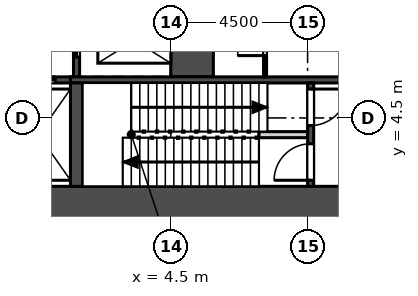
"""IFC4 building model, lengths in metres.
Left out: names, types, materials, properties, quantities, classifications, styles, units other than length and angle.
Written with IfcOpenShell. Run it as: python <this file> out.ifc"""

import sys

from ifc_helpers import new_model, si_unit, direction, frame, frame_2d, origin, place, context, subcontext, project, spatial, rectangle, extrude, element, fill, save


model = new_model("IFC4")
c1 = context("Model", 3, precision=1e-05, world=origin(), true_north=direction((0.0, 1.0)))
c2 = subcontext(c1, "Body", "Model", "MODEL_VIEW")
j1 = project(units=[si_unit("LENGTHUNIT", "METRE"), si_unit("PLANEANGLEUNIT", "RADIAN")], contexts=[c1])
p1 = place(None, origin())
s1 = spatial("IfcSite", under=j1, at=p1, CompositionType="ELEMENT")
p2 = place(p1, origin())
s2 = spatial("IfcBuilding", under=s1, at=p2, CompositionType="ELEMENT")
p3 = place(p2, frame((0.0, 0.0, 132.1)))
s3 = spatial("IfcBuildingStorey", under=s2, at=p3, CompositionType="ELEMENT", Elevation=132.1)
p4 = place(p3, frame((-13.8, 1.65, 0.0), z_axis=(0.0, 0.0, 1.0), x_axis=(1.0, 0.0, 0.0)))
e1 = element("IfcWall", 1, at=p4, inside=s3, PredefinedType="SHEAR", context=c2, shape_type="SweptSolid", body=[
    extrude(rectangle(XDim=27.6, YDim=1.2, at=frame_2d((13.8, 0.0))), origin(), (0.0, 0.0, 1.0), 5.4),
])
p5 = place(p3, frame((1.4, 5.85, -0.4), z_axis=(0.0, 0.0, 1.0), x_axis=(0.0, 1.0, 0.0)))
e2 = element("IfcWall", 2, at=p5, inside=s3, PredefinedType="SOLIDWALL", context=c2, shape_type="SweptSolid", body=[
    extrude(rectangle(XDim=11.75, YDim=0.2, at=frame_2d((5.875, 0.0))), origin(), (0.0, 0.0, 1.0), 5.4),
])
p6 = place(p5, frame((0.65, 0.0, 0.4)))
e3 = element("IfcOpeningElement", 3, at=p6, cuts=e2, PredefinedType="OPENING", context=c2, shape_type="SweptSolid", body=[
    extrude(rectangle(XDim=1.1, YDim=2.1, at=frame_2d((0.55, 1.05))), frame((0.0, 0.11, 0.0), z_axis=(0.0, -1.0, 0.0), x_axis=(1.0, 0.0, 0.0)), (0.0, 0.0, 1.0), 0.22),
])
p7 = place(p5, frame((3.3, 0.0, 0.4)))
e4 = element("IfcOpeningElement", 4, at=p7, cuts=e2, PredefinedType="OPENING", context=c2, shape_type="SweptSolid", body=[
    extrude(rectangle(XDim=1.0, YDim=2.1, at=frame_2d((0.5, 1.05))), frame((0.0, 0.11, 0.0), z_axis=(0.0, -1.0, 0.0), x_axis=(1.0, 0.0, 0.0)), (0.0, 0.0, 1.0), 0.22),
])
p8 = place(p3, frame((5.2, 5.85, -0.4), z_axis=(0.0, 0.0, 1.0), x_axis=(0.0, 1.0, 0.0)))
e5 = element("IfcWall", 5, at=p8, inside=s3, PredefinedType="SOLIDWALL", context=c2, shape_type="SweptSolid", body=[
    extrude(rectangle(XDim=2.4, YDim=1.4, at=frame_2d((1.2, 0.0))), origin(), (0.0, 0.0, 1.0), 5.4),
])
p9 = place(p3, frame((-1.2, 5.75, -0.4), z_axis=(0.0, 0.0, 1.0), x_axis=(1.0, 0.0, 0.0)))
e6 = element("IfcWall", 6, at=p9, inside=s3, PredefinedType="SOLIDWALL", context=c2, shape_type="SweptSolid", body=[
    extrude(rectangle(XDim=2.4, YDim=0.2, at=frame_2d((1.2, 0.0))), origin(), (0.0, 0.0, 1.0), 5.4),
])
p10 = place(p9, frame((0.5, 0.0, 0.4)))
e7 = element("IfcOpeningElement", 7, at=p10, cuts=e6, PredefinedType="OPENING", context=c2, shape_type="SweptSolid", body=[
    extrude(rectangle(XDim=1.4, YDim=2.1, at=frame_2d((0.7, 1.05))), frame((0.0, 0.11, 0.0), z_axis=(0.0, -1.0, 0.0), x_axis=(1.0, 0.0, 0.0)), (0.0, 0.0, 1.0), 0.22),
])
p11 = place(p3, frame((1.2, 5.75, -0.4), z_axis=(0.0, 0.0, 1.0), x_axis=(1.0, 0.0, 0.0)))
e8 = element("IfcWall", 8, at=p11, inside=s3, PredefinedType="SOLIDWALL", context=c2, shape_type="SweptSolid", body=[
    extrude(rectangle(XDim=11.4, YDim=0.2, at=frame_2d((5.7, 0.0))), origin(), (0.0, 0.0, 1.0), 5.4),
])
p12 = place(p3, frame((9.1, 2.25, -0.4), z_axis=(0.0, 0.0, 1.0), x_axis=(0.0, 1.0, 0.0)))
e9 = element("IfcWall", 9, at=p12, inside=s3, PredefinedType="SOLIDWALL", context=c2, shape_type="SweptSolid", body=[
    extrude(rectangle(XDim=3.4, YDim=0.2, at=frame_2d((1.7, 0.0))), origin(), (0.0, 0.0, 1.0), 5.4),
])
p13 = place(p12, frame((0.2, 0.0, 0.4)))
e10 = element("IfcOpeningElement", 10, at=p13, cuts=e9, PredefinedType="OPENING", context=c2, shape_type="SweptSolid", body=[
    extrude(rectangle(XDim=1.2, YDim=2.1, at=frame_2d((0.6, 1.05))), frame((0.0, 0.11, 0.0), z_axis=(0.0, -1.0, 0.0), x_axis=(1.0, 0.0, 0.0)), (0.0, 0.0, 1.0), 0.22),
])
p14 = place(p12, frame((2.0, 0.0, 0.4)))
e11 = element("IfcOpeningElement", 11, at=p14, cuts=e9, PredefinedType="OPENING", context=c2, shape_type="SweptSolid", body=[
    extrude(rectangle(XDim=1.2, YDim=2.1, at=frame_2d((0.6, 1.05))), frame((0.0, 0.11, 0.0), z_axis=(0.0, -1.0, 0.0), x_axis=(1.0, 0.0, 0.0)), (0.0, 0.0, 1.0), 0.22),
])
p15 = place(p3, frame((1.4, 2.25, -0.4), z_axis=(0.0, 0.0, 1.0), x_axis=(0.0, 1.0, 0.0)))
e12 = element("IfcWall", 12, at=p15, inside=s3, PredefinedType="SOLIDWALL", context=c2, shape_type="SweptSolid", body=[
    extrude(rectangle(XDim=3.4, YDim=0.4, at=frame_2d((1.7, 0.0))), origin(), (0.0, 0.0, 1.0), 5.4),
])
p16 = place(p3, frame((7.6, 5.85, 0.0), z_axis=(0.0, 0.0, 1.0), x_axis=(0.0, 1.0, 0.0)))
e13 = element("IfcWall", 13, at=p16, inside=s3, PredefinedType="PARTITIONING", context=c2, shape_type="SweptSolid", body=[
    extrude(rectangle(XDim=2.4, YDim=0.1, at=frame_2d((1.2, 0.0))), origin(), (0.0, 0.0, 1.0), 5.0),
])
p17 = place(p16, frame((0.7, 0.0, 0.0)))
e14 = element("IfcOpeningElement", 14, at=p17, cuts=e13, PredefinedType="OPENING", context=c2, shape_type="SweptSolid", body=[
    extrude(rectangle(XDim=0.9, YDim=2.1, at=frame_2d((0.45, 1.05))), frame((0.0, 0.06, 0.0), z_axis=(0.0, -1.0, 0.0), x_axis=(1.0, 0.0, 0.0)), (0.0, 0.0, 1.0), 0.12),
])
p18 = place(p3, frame((7.4, 3.95, 0.0), z_axis=(0.0, 0.0, 1.0), x_axis=(1.0, 0.0, 0.0)))
e15 = element("IfcWall", 15, at=p18, inside=s3, PredefinedType="SOLIDWALL", context=c2, shape_type="SweptSolid", body=[
    extrude(rectangle(XDim=1.6, YDim=0.2, at=frame_2d((0.8, 0.0))), origin(), (0.0, 0.0, 1.0), 5.0),
])
p19 = place(p6, origin())
e16 = element("IfcDoor", 16, at=p19, inside=s3, OperationType="SLIDING_TO_RIGHT", PredefinedType="DOOR", context=c2, shape_type="SweptSolid", body=[
    extrude(rectangle(XDim=1.1, YDim=2.1, at=frame_2d((0.55, 1.05))), frame((0.0, 0.025, 0.0), z_axis=(0.0, -1.0, 0.0), x_axis=(1.0, 0.0, 0.0)), (0.0, 0.0, 1.0), 0.05),
])
fill(e3, e16)
p20 = place(p10, origin())
e17 = element("IfcDoor", 17, at=p20, inside=s3, OperationType="SLIDING_TO_LEFT", PredefinedType="DOOR", context=c2, shape_type="SweptSolid", body=[
    extrude(rectangle(XDim=1.4, YDim=2.1, at=frame_2d((0.7, 1.05))), frame((0.0, 0.025, 0.0), z_axis=(0.0, -1.0, 0.0), x_axis=(1.0, 0.0, 0.0)), (0.0, 0.0, 1.0), 0.05),
])
fill(e7, e17)
p21 = place(p17, origin())
e18 = element("IfcDoor", 18, at=p21, inside=s3, OperationType="SINGLE_SWING_LEFT", PredefinedType="DOOR", context=c2, shape_type="SweptSolid", body=[
    extrude(rectangle(XDim=0.9, YDim=2.1, at=frame_2d((0.45, 1.05))), frame((0.0, 0.025, 0.0), z_axis=(0.0, -1.0, 0.0), x_axis=(1.0, 0.0, 0.0)), (0.0, 0.0, 1.0), 0.05),
])
fill(e14, e18)
p22 = place(p13, origin())
e19 = element("IfcDoor", 19, at=p22, inside=s3, OperationType="SINGLE_SWING_LEFT", PredefinedType="DOOR", context=c2, shape_type="SweptSolid", body=[
    extrude(rectangle(XDim=1.2, YDim=2.1, at=frame_2d((0.6, 1.05))), frame((0.0, 0.025, 0.0), z_axis=(0.0, -1.0, 0.0), x_axis=(1.0, 0.0, 0.0)), (0.0, 0.0, 1.0), 0.05),
])
fill(e10, e19)
p23 = place(p14, frame((1.2, 0.0, 0.0), z_axis=(0.0, 0.0, 1.0), x_axis=(-1.0, 0.0, 0.0)))
e20 = element("IfcDoor", 20, at=p23, inside=s3, OperationType="SINGLE_SWING_LEFT", PredefinedType="DOOR", context=c2, shape_type="SweptSolid", body=[
    extrude(rectangle(XDim=1.2, YDim=2.1, at=frame_2d((0.6, 1.05))), frame((0.0, 0.025, 0.0), z_axis=(0.0, -1.0, 0.0), x_axis=(1.0, 0.0, 0.0)), (0.0, 0.0, 1.0), 0.05),
])
fill(e11, e20)
save(model, sys.argv[1])
